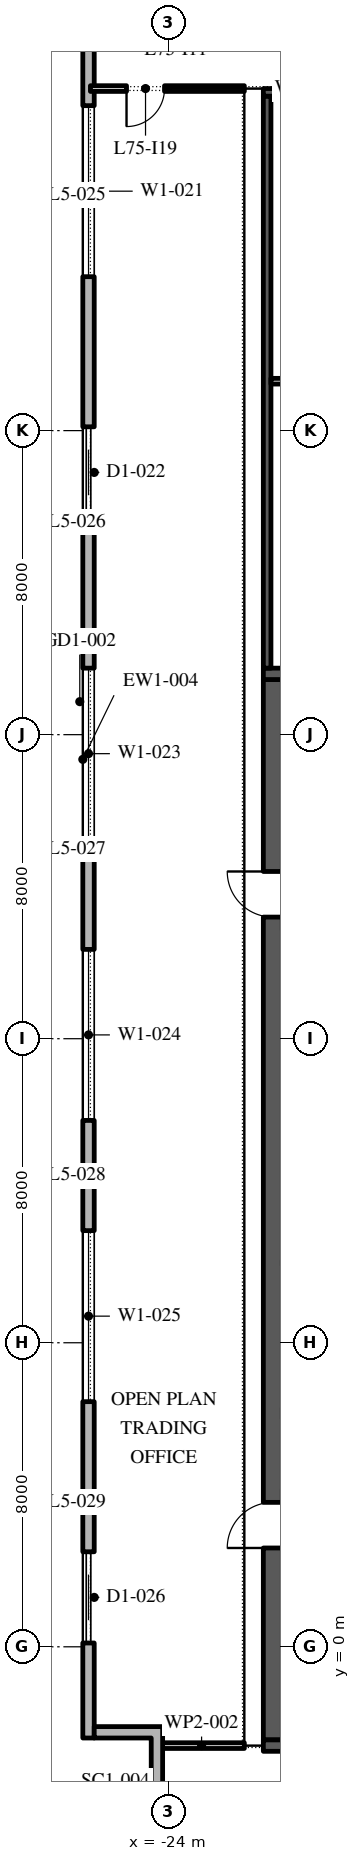
"""IFC4 building model, lengths in metres.
Left out: names, types, materials, properties, quantities, classifications, styles, units other than length and angle.
Written with IfcOpenShell. Run it as: python <this file> out.ifc"""

import sys

from ifc_helpers import new_model, si_unit, direction, frame, frame_2d, origin, place, context, subcontext, project, spatial, polyline, rectangle, outline, extrude, element, fill, save


model = new_model("IFC4")
c1 = context("Model", 3, precision=1e-05, world=origin(), true_north=direction((0.0, 1.0)))
c2 = subcontext(c1, "Body", "Model", "MODEL_VIEW")
j1 = project(units=[si_unit("LENGTHUNIT", "METRE"), si_unit("PLANEANGLEUNIT", "RADIAN")], contexts=[c1])
p1 = place(None, origin())
s1 = spatial("IfcSite", under=j1, at=p1, CompositionType="ELEMENT")
p2 = place(p1, origin())
s2 = spatial("IfcBuilding", under=s1, at=p2, CompositionType="ELEMENT")
p3 = place(p2, frame((0.0, 0.0, 342.6)))
s3 = spatial("IfcBuildingStorey", under=s2, at=p3, CompositionType="ELEMENT", Elevation=342.6)
p4 = place(p3, frame((-26.1, 49.1, 0.0), z_axis=(0.0, 0.0, 1.0), x_axis=(0.0, -1.0, 0.0)))
e1 = element("IfcWall", 1, at=p4, inside=s3, PredefinedType="STANDARD", context=c2, shape_type="SweptSolid", body=[
    extrude(rectangle(XDim=51.5, YDim=0.3, at=frame_2d((25.75, 0.0))), origin(), (0.0, 0.0, 1.0), 4.0),
])
p5 = place(p4, frame((1.3, 0.0, 0.45)))
e2 = element("IfcOpeningElement", 2, at=p5, cuts=e1, PredefinedType="OPENING", context=c2, shape_type="SweptSolid", body=[
    extrude(rectangle(XDim=4.5, YDim=3.05, at=frame_2d((2.25, 1.525))), frame((0.0, 0.16, 0.0), z_axis=(0.0, -1.0, 0.0), x_axis=(1.0, 0.0, 0.0)), (0.0, 0.0, 1.0), 0.32),
])
p6 = place(p4, frame((8.55, 0.0, 0.45)))
e3 = element("IfcOpeningElement", 3, at=p6, cuts=e1, PredefinedType="OPENING", context=c2, shape_type="SweptSolid", body=[
    extrude(rectangle(XDim=4.5, YDim=3.05, at=frame_2d((2.25, 1.525))), frame((0.0, 0.16, 0.0), z_axis=(0.0, -1.0, 0.0), x_axis=(1.0, 0.0, 0.0)), (0.0, 0.0, 1.0), 0.32),
])
p7 = place(p4, frame((17.0, 0.0, 0.0)))
e4 = element("IfcOpeningElement", 4, at=p7, cuts=e1, PredefinedType="OPENING", context=c2, shape_type="SweptSolid", body=[
    extrude(rectangle(XDim=2.4, YDim=3.5, at=frame_2d((1.2, 1.75))), frame((0.0, 0.16, 0.0), z_axis=(0.0, -1.0, 0.0), x_axis=(1.0, 0.0, 0.0)), (0.0, 0.0, 1.0), 0.32),
])
p8 = place(p4, frame((23.35, 0.0, 0.45)))
e5 = element("IfcOpeningElement", 5, at=p8, cuts=e1, PredefinedType="OPENING", context=c2, shape_type="SweptSolid", body=[
    extrude(rectangle(XDim=4.5, YDim=3.05, at=frame_2d((2.25, 1.525))), frame((0.0, 0.16, 0.0), z_axis=(0.0, -1.0, 0.0), x_axis=(1.0, 0.0, 0.0)), (0.0, 0.0, 1.0), 0.32),
])
p9 = place(p4, frame((30.75, 0.0, 0.45)))
e6 = element("IfcOpeningElement", 6, at=p9, cuts=e1, PredefinedType="OPENING", context=c2, shape_type="SweptSolid", body=[
    extrude(rectangle(XDim=4.5, YDim=3.05, at=frame_2d((2.25, 1.525))), frame((0.0, 0.16, 0.0), z_axis=(0.0, -1.0, 0.0), x_axis=(1.0, 0.0, 0.0)), (0.0, 0.0, 1.0), 0.32),
])
p10 = place(p4, frame((38.15, 0.0, 0.45)))
e7 = element("IfcOpeningElement", 7, at=p10, cuts=e1, PredefinedType="OPENING", context=c2, shape_type="SweptSolid", body=[
    extrude(rectangle(XDim=4.5, YDim=3.05, at=frame_2d((2.25, 1.525))), frame((0.0, 0.16, 0.0), z_axis=(0.0, -1.0, 0.0), x_axis=(1.0, 0.0, 0.0)), (0.0, 0.0, 1.0), 0.32),
])
p11 = place(p4, frame((46.6, 0.0, 0.0)))
e8 = element("IfcOpeningElement", 8, at=p11, cuts=e1, PredefinedType="OPENING", context=c2, shape_type="SweptSolid", body=[
    extrude(rectangle(XDim=2.4, YDim=3.5, at=frame_2d((1.2, 1.75))), frame((0.0, 0.16, 0.0), z_axis=(0.0, -1.0, 0.0), x_axis=(1.0, 0.0, 0.0)), (0.0, 0.0, 1.0), 0.32),
])
p12 = place(p3, origin())
e9 = element("IfcWall", 9, at=p12, inside=s3, PredefinedType="STANDARD", context=c2, shape_type="SweptSolid", body=[
    extrude(outline(polyline([(-22.65, -4.2), (-24.45, -4.2), (-24.45, -2.4), (-25.95, -2.4), (-25.95, -2.1), (-24.15, -2.1), (-24.15, -3.9), (-22.35, -3.9), (-22.35, -6.0), (-22.65, -6.0), (-22.65, -4.2)])), origin(), (0.0, 0.0, 1.0), 4.0),
])
p13 = place(p3, frame((-21.25, -2.45, 0.0), z_axis=(0.0, 0.0, 1.0), x_axis=(0.0, 1.0, 0.0)))
e10 = element("IfcWall", 10, at=p13, inside=s3, PredefinedType="SHEAR", context=c2, shape_type="SweptSolid", body=[
    extrude(rectangle(XDim=27.9, YDim=0.5, at=frame_2d((13.95, 0.0))), origin(), (0.0, 0.0, 1.0), 4.0),
])
p14 = place(p13, frame((5.05, 0.0, 0.0)))
e11 = element("IfcOpeningElement", 11, at=p14, cuts=e10, PredefinedType="OPENING", context=c2, shape_type="SweptSolid", body=[
    extrude(rectangle(XDim=1.2, YDim=2.1, at=frame_2d((0.6, 1.05))), frame((0.0, 0.26, 0.0), z_axis=(0.0, -1.0, 0.0), x_axis=(1.0, 0.0, 0.0)), (0.0, 0.0, 1.0), 0.52),
])
p15 = place(p13, frame((21.65, 0.0, 0.0)))
e12 = element("IfcOpeningElement", 12, at=p15, cuts=e10, PredefinedType="OPENING", context=c2, shape_type="SweptSolid", body=[
    extrude(rectangle(XDim=1.2, YDim=2.1, at=frame_2d((0.6, 1.05))), frame((0.0, 0.26, 0.0), z_axis=(0.0, -1.0, 0.0), x_axis=(1.0, 0.0, 0.0)), (0.0, 0.0, 1.0), 0.52),
])
for number, where, z_axis, x_axis in (
    (13, (-21.5, -2.6, 0.0), (0.0, 0.0, 1.0), (1.0, 0.0, 0.0)),
    (14, (-21.5, 25.6, 0.0), (0.0, 0.0, 1.0), (1.0, 0.0, 0.0)),
):
    element("IfcWall", number, at=place(p3, frame(where, z_axis=z_axis, x_axis=x_axis)), inside=s3, PredefinedType="SHEAR", context=c2, shape_type="SweptSolid", body=[
        extrude(rectangle(XDim=11.0, YDim=0.3, at=frame_2d((5.5, 0.0))), origin(), (0.0, 0.0, 1.0), 4.0),
    ])
p16 = place(p3, frame((-21.4, 25.75, 0.0), z_axis=(0.0, 0.0, 1.0), x_axis=(0.0, 1.0, 0.0)))
e15 = element("IfcWall", 15, at=p16, inside=s3, PredefinedType="SHEAR", context=c2, shape_type="SweptSolid", body=[
    extrude(rectangle(XDim=15.05, YDim=0.2, at=frame_2d((7.525, 0.0))), origin(), (0.0, 0.0, 1.0), 4.0),
])
p17 = place(p3, frame((-21.5, 40.9, 0.0), z_axis=(0.0, 0.0, 1.0), x_axis=(1.0, 0.0, 0.0)))
e16 = element("IfcWall", 16, at=p17, inside=s3, PredefinedType="SHEAR", context=c2, shape_type="SweptSolid", body=[
    extrude(rectangle(XDim=11.0, YDim=0.2, at=frame_2d((5.5, 0.0))), origin(), (0.0, 0.0, 1.0), 4.0),
])
p18 = place(p3, frame((-21.3, 33.3, 0.0), z_axis=(0.0, 0.0, 1.0), x_axis=(1.0, 0.0, 0.0)))
e17 = element("IfcWall", 17, at=p18, inside=s3, PredefinedType="PARTITIONING", context=c2, shape_type="SweptSolid", body=[
    extrude(rectangle(XDim=10.6, YDim=0.15, at=frame_2d((5.3, 0.0))), origin(), (0.0, 0.0, 1.0), 4.0),
])
p19 = place(p3, frame((-24.25, -2.6, 0.0), z_axis=(0.0, 0.0, 1.0), x_axis=(1.0, 0.0, 0.0)))
e18 = element("IfcWall", 18, at=p19, inside=s3, PredefinedType="PARTITIONING", context=c2, shape_type="SweptSolid", body=[
    extrude(rectangle(XDim=2.25, YDim=0.15, at=frame_2d((1.125, 0.0))), origin(), (0.0, 0.0, 1.0), 4.0),
])
p20 = place(p3, frame((-22.0, 41.0, 0.0), z_axis=(0.0, 0.0, 1.0), x_axis=(-1.0, 0.0, 0.0)))
e19 = element("IfcWall", 19, at=p20, inside=s3, PredefinedType="PARTITIONING", context=c2, shape_type="SweptSolid", body=[
    extrude(rectangle(XDim=4.05, YDim=0.15, at=frame_2d((2.025, 0.0))), origin(), (0.0, 0.0, 1.0), 4.0),
])
p21 = place(p20, frame((2.1, 0.0, 0.0)))
e20 = element("IfcOpeningElement", 20, at=p21, cuts=e19, PredefinedType="OPENING", context=c2, shape_type="SweptSolid", body=[
    extrude(rectangle(XDim=1.0, YDim=2.1, at=frame_2d((0.5, 1.05))), frame((0.0, 0.085, 0.0), z_axis=(0.0, -1.0, 0.0), x_axis=(1.0, 0.0, 0.0)), (0.0, 0.0, 1.0), 0.17),
])
p22 = place(p6, origin())
e21 = element("IfcWindow", 21, at=p22, inside=s3, PartitioningType="DOUBLE_PANEL_VERTICAL", PredefinedType="WINDOW", context=c2, shape_type="SweptSolid", body=[
    extrude(rectangle(XDim=4.5, YDim=3.05, at=frame_2d((2.25, 1.525))), frame((0.0, 0.03, 0.0), z_axis=(0.0, -1.0, 0.0), x_axis=(1.0, 0.0, 0.0)), (0.0, 0.0, 1.0), 0.06),
])
fill(e3, e21)
p23 = place(p7, origin())
e22 = element("IfcDoor", 22, at=p23, inside=s3, OperationType="DOUBLE_DOOR_SLIDING", PredefinedType="DOOR", context=c2, shape_type="SweptSolid", body=[
    extrude(rectangle(XDim=2.4, YDim=3.5, at=frame_2d((1.2, 1.75))), frame((0.0, 0.025, 0.0), z_axis=(0.0, -1.0, 0.0), x_axis=(1.0, 0.0, 0.0)), (0.0, 0.0, 1.0), 0.05),
])
fill(e4, e22)
p24 = place(p8, origin())
e23 = element("IfcWindow", 23, at=p24, inside=s3, PartitioningType="DOUBLE_PANEL_VERTICAL", PredefinedType="WINDOW", context=c2, shape_type="SweptSolid", body=[
    extrude(rectangle(XDim=4.5, YDim=3.05, at=frame_2d((2.25, 1.525))), frame((0.0, 0.03, 0.0), z_axis=(0.0, -1.0, 0.0), x_axis=(1.0, 0.0, 0.0)), (0.0, 0.0, 1.0), 0.06),
])
fill(e5, e23)
p25 = place(p9, origin())
e24 = element("IfcWindow", 24, at=p25, inside=s3, PartitioningType="DOUBLE_PANEL_VERTICAL", PredefinedType="WINDOW", context=c2, shape_type="SweptSolid", body=[
    extrude(rectangle(XDim=4.5, YDim=3.05, at=frame_2d((2.25, 1.525))), frame((0.0, 0.03, 0.0), z_axis=(0.0, -1.0, 0.0), x_axis=(1.0, 0.0, 0.0)), (0.0, 0.0, 1.0), 0.06),
])
fill(e6, e24)
p26 = place(p10, origin())
e25 = element("IfcWindow", 25, at=p26, inside=s3, PartitioningType="DOUBLE_PANEL_VERTICAL", PredefinedType="WINDOW", context=c2, shape_type="SweptSolid", body=[
    extrude(rectangle(XDim=4.5, YDim=3.05, at=frame_2d((2.25, 1.525))), frame((0.0, 0.03, 0.0), z_axis=(0.0, -1.0, 0.0), x_axis=(1.0, 0.0, 0.0)), (0.0, 0.0, 1.0), 0.06),
])
fill(e7, e25)
p27 = place(p11, origin())
e26 = element("IfcDoor", 26, at=p27, inside=s3, OperationType="DOUBLE_DOOR_SLIDING", PredefinedType="DOOR", context=c2, shape_type="SweptSolid", body=[
    extrude(rectangle(XDim=2.4, YDim=3.5, at=frame_2d((1.2, 1.75))), frame((0.0, 0.025, 0.0), z_axis=(0.0, -1.0, 0.0), x_axis=(1.0, 0.0, 0.0)), (0.0, 0.0, 1.0), 0.05),
])
fill(e8, e26)
p28 = place(p14, origin())
e27 = element("IfcDoor", 27, at=p28, inside=s3, OperationType="SINGLE_SWING_RIGHT", PredefinedType="DOOR", context=c2, shape_type="SweptSolid", body=[
    extrude(rectangle(XDim=1.2, YDim=2.1, at=frame_2d((0.6, 1.05))), frame((0.0, 0.025, 0.0), z_axis=(0.0, -1.0, 0.0), x_axis=(1.0, 0.0, 0.0)), (0.0, 0.0, 1.0), 0.05),
])
fill(e11, e27)
p29 = place(p15, origin())
e28 = element("IfcDoor", 28, at=p29, inside=s3, OperationType="SINGLE_SWING_LEFT", PredefinedType="DOOR", context=c2, shape_type="SweptSolid", body=[
    extrude(rectangle(XDim=1.2, YDim=2.1, at=frame_2d((0.6, 1.05))), frame((0.0, 0.025, 0.0), z_axis=(0.0, -1.0, 0.0), x_axis=(1.0, 0.0, 0.0)), (0.0, 0.0, 1.0), 0.05),
])
fill(e12, e28)
p30 = place(p21, origin())
e29 = element("IfcDoor", 29, at=p30, inside=s3, OperationType="SINGLE_SWING_LEFT", PredefinedType="DOOR", context=c2, shape_type="SweptSolid", body=[
    extrude(rectangle(XDim=1.0, YDim=2.1, at=frame_2d((0.5, 1.05))), frame((0.0, 0.025, 0.0), z_axis=(0.0, -1.0, 0.0), x_axis=(1.0, 0.0, 0.0)), (0.0, 0.0, 1.0), 0.05),
])
fill(e20, e29)
save(model, sys.argv[1])
